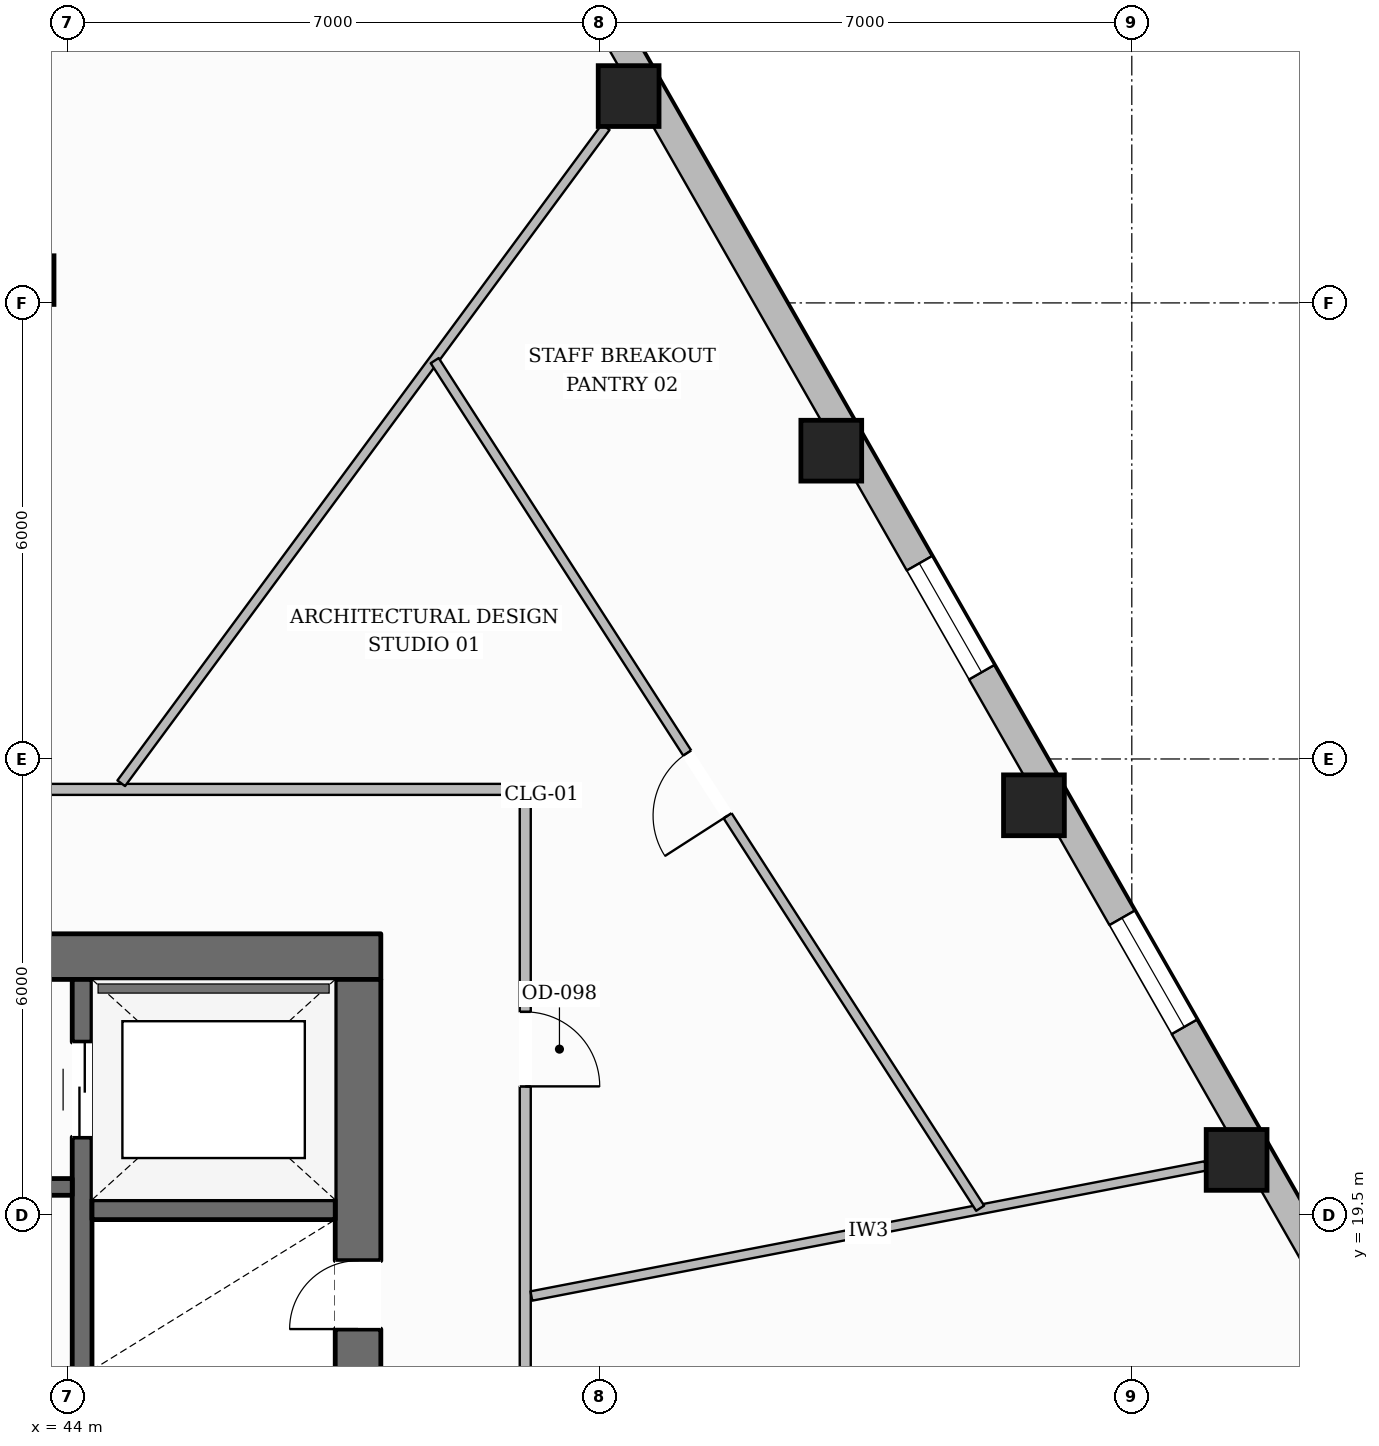
"""IFC4 building model, lengths in metres.
Left out: names, types, materials, properties, quantities, classifications, styles, units other than length and angle.
Written with IfcOpenShell. Run it as: python <this file> out.ifc"""

import sys

from ifc_helpers import new_model, si_unit, direction, frame, frame_2d, origin, origin_2d, place, context, subcontext, project, spatial, rectangle, hollow_rectangle, extrude, element, fill, save


model = new_model("IFC4")
c1 = context("Model", 3, precision=1e-05, world=origin(), true_north=direction((0.0, 1.0)))
c2 = subcontext(c1, "Body", "Model", "MODEL_VIEW")
j1 = project(units=[si_unit("LENGTHUNIT", "METRE"), si_unit("PLANEANGLEUNIT", "RADIAN")], contexts=[c1])
p1 = place(None, origin())
s1 = spatial("IfcSite", under=j1, at=p1, CompositionType="ELEMENT")
p2 = place(p1, origin())
s2 = spatial("IfcBuilding", under=s1, at=p2, CompositionType="ELEMENT")
p3 = place(p2, frame((0.0, 0.0, 9.85)))
s3 = spatial("IfcBuildingStorey", under=s2, at=p3, CompositionType="ELEMENT", Elevation=9.85)
p4 = place(p3, frame((27.88, 22.9, 0.0), z_axis=(0.0, 0.0, 1.0), x_axis=(1.0, 0.0, 0.0)))
e1 = element("IfcWall", 1, at=p4, inside=s3, PredefinedType="SOLIDWALL", context=c2, shape_type="SweptSolid", body=[
    extrude(rectangle(XDim=20.24, YDim=0.6, at=frame_2d((10.12, 0.0))), origin(), (0.0, 0.0, 1.0), 3.59),
])
p5 = place(p4, frame((6.395, 0.0, 0.0)))
e2 = element("IfcOpeningElement", 2, at=p5, cuts=e1, PredefinedType="OPENING", context=c2, shape_type="SweptSolid", body=[
    extrude(rectangle(XDim=1.05, YDim=2.15, at=frame_2d((0.525, 1.075))), frame((0.0, 0.31, 0.0), z_axis=(0.0, -1.0, 0.0), x_axis=(1.0, 0.0, 0.0)), (0.0, 0.0, 1.0), 0.62),
])
p6 = place(p4, frame((12.795, 0.0, 0.0)))
e3 = element("IfcOpeningElement", 3, at=p6, cuts=e1, PredefinedType="OPENING", context=c2, shape_type="SweptSolid", body=[
    extrude(rectangle(XDim=1.05, YDim=2.15, at=frame_2d((0.525, 1.075))), frame((0.0, 0.31, 0.0), z_axis=(0.0, -1.0, 0.0), x_axis=(1.0, 0.0, 0.0)), (0.0, 0.0, 1.0), 0.62),
])
p7 = place(p3, frame((47.82, 9.6, 0.0), z_axis=(0.0, 0.0, 1.0), x_axis=(0.0, 1.0, 0.0)))
e4 = element("IfcWall", 4, at=p7, inside=s3, PredefinedType="SOLIDWALL", context=c2, shape_type="SweptSolid", body=[
    extrude(rectangle(XDim=13.0, YDim=0.6, at=frame_2d((6.5, 0.0))), origin(), (0.0, 0.0, 1.0), 3.59),
])
p8 = place(p7, frame((0.2, 0.0, 0.0)))
e5 = element("IfcOpeningElement", 5, at=p8, cuts=e4, PredefinedType="OPENING", context=c2, shape_type="SweptSolid", body=[
    extrude(rectangle(XDim=1.1, YDim=2.15, at=frame_2d((0.55, 1.075))), frame((0.0, 0.31, 0.0), z_axis=(0.0, -1.0, 0.0), x_axis=(1.0, 0.0, 0.0)), (0.0, 0.0, 1.0), 0.62),
])
p9 = place(p7, frame((8.4, 0.0, 0.0)))
e6 = element("IfcOpeningElement", 6, at=p9, cuts=e4, PredefinedType="OPENING", context=c2, shape_type="SweptSolid", body=[
    extrude(rectangle(XDim=0.9, YDim=2.1, at=frame_2d((0.45, 1.05))), frame((0.0, 0.31, 0.0), z_axis=(0.0, -1.0, 0.0), x_axis=(1.0, 0.0, 0.0)), (0.0, 0.0, 1.0), 0.62),
])
p10 = place(p3, frame((44.19, 9.6, 0.0), z_axis=(0.0, 0.0, 1.0), x_axis=(0.0, 1.0, 0.0)))
e7 = element("IfcWall", 7, at=p10, inside=s3, PredefinedType="SHEAR", context=c2, shape_type="SweptSolid", body=[
    extrude(rectangle(XDim=13.0, YDim=0.26, at=frame_2d((6.5, 0.0))), origin(), (0.0, 0.0, 1.0), 3.59),
])
p11 = place(p10, frame((10.925, 0.0, 0.0)))
e8 = element("IfcOpeningElement", 8, at=p11, cuts=e7, PredefinedType="OPENING", context=c2, shape_type="SweptSolid", body=[
    extrude(rectangle(XDim=1.25, YDim=2.25, at=frame_2d((0.625, 1.125))), frame((0.0, 0.14, 0.0), z_axis=(0.0, -1.0, 0.0), x_axis=(1.0, 0.0, 0.0)), (0.0, 0.0, 1.0), 0.28),
])
p12 = place(p3, frame((44.32, 19.57, 0.0), z_axis=(0.0, 0.0, 1.0), x_axis=(1.0, 0.0, 0.0)))
e9 = element("IfcWall", 9, at=p12, inside=s3, PredefinedType="SHEAR", context=c2, shape_type="SweptSolid", body=[
    extrude(rectangle(XDim=3.2, YDim=0.26, at=frame_2d((1.6, 0.0))), origin(), (0.0, 0.0, 1.0), 3.59),
])
p13 = place(p3, frame((31.94, 19.87, 0.0), z_axis=(0.0, 0.0, 1.0), x_axis=(1.0, 0.0, 0.0)))
e10 = element("IfcWall", 10, at=p13, inside=s3, PredefinedType="SOLIDWALL", context=c2, shape_type="SweptSolid", body=[
    extrude(rectangle(XDim=12.12, YDim=0.22, at=frame_2d((6.06, 0.0))), origin(), (0.0, 0.0, 1.0), 3.59),
])
p14 = place(p13, frame((6.3, 0.0, 0.0)))
e11 = element("IfcOpeningElement", 11, at=p14, cuts=e10, PredefinedType="OPENING", context=c2, shape_type="SweptSolid", body=[
    extrude(rectangle(XDim=1.1, YDim=2.15, at=frame_2d((0.55, 1.075))), frame((0.0, 0.12, 0.0), z_axis=(0.0, -1.0, 0.0), x_axis=(1.0, 0.0, 0.0)), (0.0, 0.0, 1.0), 0.24),
])
p15 = place(p13, frame((8.61, 0.0, 0.0)))
e12 = element("IfcOpeningElement", 12, at=p15, cuts=e10, PredefinedType="OPENING", context=c2, shape_type="SweptSolid", body=[
    extrude(rectangle(XDim=0.9, YDim=2.1, at=frame_2d((0.45, 1.05))), frame((0.0, 0.12, 0.0), z_axis=(0.0, -1.0, 0.0), x_axis=(1.0, 0.0, 0.0)), (0.0, 0.0, 1.0), 0.24),
])
p16 = place(p13, frame((10.85, 0.0, 0.0)))
e13 = element("IfcOpeningElement", 13, at=p16, cuts=e10, PredefinedType="OPENING", context=c2, shape_type="SweptSolid", body=[
    extrude(rectangle(XDim=0.9, YDim=2.1, at=frame_2d((0.45, 1.05))), frame((0.0, 0.12, 0.0), z_axis=(0.0, -1.0, 0.0), x_axis=(1.0, 0.0, 0.0)), (0.0, 0.0, 1.0), 0.24),
])
for number, where, z_axis, x_axis in (
    (14, (59.379, 20.225, 0.0), (0.0, 0.0, 1.0), (1.0, 0.0, 0.0)),
    (15, (56.712, 24.891, 0.0), (0.0, 0.0, 1.0), (1.0, 0.0, 0.0)),
    (16, (54.046, 29.556, 0.0), (0.0, 0.0, 1.0), (1.0, 0.0, 0.0)),
    (17, (51.38, 34.221, 0.0), (0.0, 0.0, 1.0), (1.0, 0.0, 0.0)),
):
    element("IfcColumn", number, at=place(p3, frame(where, z_axis=z_axis, x_axis=x_axis)), inside=s3, PredefinedType="COLUMN", context=c2, shape_type="SweptSolid", body=[
        extrude(hollow_rectangle(XDim=0.8, YDim=0.8, WallThickness=0.036, at=origin_2d()), origin(), (0.0, 0.0, 1.0), 3.59),
    ])
p17 = place(p3, frame((43.5, 31.8, 0.0), z_axis=(0.0, 0.0, 1.0), x_axis=(1.0, 0.0, 0.0)))
e18 = element("IfcColumn", 18, at=p17, inside=s3, PredefinedType="COLUMN", context=c2, shape_type="SweptSolid", body=[
    extrude(hollow_rectangle(XDim=0.64, YDim=0.64, WallThickness=0.028, at=origin_2d()), origin(), (0.0, 0.0, 1.0), 3.59),
])
p18 = place(p3, frame((46.044, 44.103, 0.0), z_axis=(0.0, 0.0, 1.0), x_axis=(0.496189626602, -0.86821417545, 0.0)))
e19 = element("IfcWall", 19, at=p18, inside=s3, PredefinedType="STANDARD", context=c2, shape_type="SweptSolid", body=[
    extrude(rectangle(XDim=33.196, YDim=0.38, at=frame_2d((16.598, 0.0))), origin(), (0.0, 0.0, 1.0), 2.97),
])
p19 = place(p18, frame((7.899, 0.0, 0.0)))
e20 = element("IfcOpeningElement", 20, at=p19, cuts=e19, PredefinedType="OPENING", context=c2, shape_type="SweptSolid", body=[
    extrude(rectangle(XDim=1.0, YDim=2.2, at=frame_2d((0.5, 1.1))), frame((0.0, 0.2, 0.0), z_axis=(0.0, -1.0, 0.0), x_axis=(1.0, 0.0, 0.0)), (0.0, 0.0, 1.0), 0.4),
])
p20 = place(p18, frame((29.209, 0.0, 0.65)))
e21 = element("IfcOpeningElement", 21, at=p20, cuts=e19, PredefinedType="OPENING", context=c2, shape_type="SweptSolid", body=[
    extrude(rectangle(XDim=1.65, YDim=1.75, at=frame_2d((0.825, 0.875))), frame((0.0, 0.2, 0.0), z_axis=(0.0, -1.0, 0.0), x_axis=(1.0, 0.0, 0.0)), (0.0, 0.0, 1.0), 0.4),
])
p21 = place(p18, frame((23.835, 0.0, 0.65)))
e22 = element("IfcOpeningElement", 22, at=p21, cuts=e19, PredefinedType="OPENING", context=c2, shape_type="SweptSolid", body=[
    extrude(rectangle(XDim=1.65, YDim=1.75, at=frame_2d((0.825, 0.875))), frame((0.0, 0.2, 0.0), z_axis=(0.0, -1.0, 0.0), x_axis=(1.0, 0.0, 0.0)), (0.0, 0.0, 1.0), 0.4),
])
p22 = place(p18, frame((18.462, 0.0, 0.65)))
e23 = element("IfcOpeningElement", 23, at=p22, cuts=e19, PredefinedType="OPENING", context=c2, shape_type="SweptSolid", body=[
    extrude(rectangle(XDim=1.65, YDim=1.75, at=frame_2d((0.825, 0.875))), frame((0.0, 0.2, 0.0), z_axis=(0.0, -1.0, 0.0), x_axis=(1.0, 0.0, 0.0)), (0.0, 0.0, 1.0), 0.4),
])
p23 = place(p18, frame((2.342, 0.0, 0.65)))
e24 = element("IfcOpeningElement", 24, at=p23, cuts=e19, PredefinedType="OPENING", context=c2, shape_type="SweptSolid", body=[
    extrude(rectangle(XDim=1.65, YDim=1.75, at=frame_2d((0.825, 0.875))), frame((0.0, 0.2, 0.0), z_axis=(0.0, -1.0, 0.0), x_axis=(1.0, 0.0, 0.0)), (0.0, 0.0, 1.0), 0.4),
])
p24 = place(p3, frame((39.0, 25.1, 0.0), z_axis=(0.0, 0.0, 1.0), x_axis=(1.0, 0.0, 0.0)))
e25 = element("IfcWall", 25, at=p24, inside=s3, PredefinedType="PARTITIONING", context=c2, shape_type="SweptSolid", body=[
    extrude(rectangle(XDim=11.02, YDim=0.145, at=frame_2d((5.51, 0.0))), origin(), (0.0, 0.0, 1.0), 3.59),
])
p25 = place(p3, frame((50.02, 25.1, 0.0), z_axis=(0.0, 0.0, 1.0), x_axis=(0.0, -1.0, 0.0)))
e26 = element("IfcWall", 26, at=p25, inside=s3, PredefinedType="PARTITIONING", context=c2, shape_type="SweptSolid", body=[
    extrude(rectangle(XDim=16.0, YDim=0.145, at=frame_2d((8.0, 0.0))), origin(), (0.0, 0.0, 1.0), 3.278),
])
p26 = place(p25, frame((2.927, 0.0, 0.0)))
e27 = element("IfcOpeningElement", 27, at=p26, cuts=e26, PredefinedType="OPENING", context=c2, shape_type="SweptSolid", body=[
    extrude(rectangle(XDim=0.98, YDim=2.15, at=frame_2d((0.49, 1.075))), frame((0.0, 0.083, 0.0), z_axis=(0.0, -1.0, 0.0), x_axis=(1.0, 0.0, 0.0)), (0.0, 0.0, 1.0), 0.165),
])
p27 = place(p3, frame((50.101, 18.435, 0.0), z_axis=(0.0, 0.0, 1.0), x_axis=(0.98189060445, 0.189448781713, 0.0)))
e28 = element("IfcWall", 28, at=p27, inside=s3, PredefinedType="PARTITIONING", context=c2, shape_type="SweptSolid", body=[
    extrude(rectangle(XDim=9.034, YDim=0.125, at=frame_2d((4.517, 0.0))), origin(), (0.0, 0.0, 1.0), 3.057),
])
p28 = place(p3, frame((44.705, 25.18, 0.0), z_axis=(0.0, 0.0, 1.0), x_axis=(0.593984136355, 0.804476752777, 0.0)))
e29 = element("IfcWall", 29, at=p28, inside=s3, PredefinedType="PARTITIONING", context=c2, shape_type="SweptSolid", body=[
    extrude(rectangle(XDim=10.731, YDim=0.125, at=frame_2d((5.365, 0.0))), origin(), (0.0, 0.0, 1.0), 3.057),
])
p29 = place(p3, frame((56.005, 19.59, 0.0), z_axis=(0.0, 0.0, 1.0), x_axis=(-0.541141843648, 0.840931331949, 0.0)))
e30 = element("IfcWall", 30, at=p29, inside=s3, PredefinedType="PARTITIONING", context=c2, shape_type="SweptSolid", body=[
    extrude(rectangle(XDim=13.26, YDim=0.125, at=frame_2d((6.63, 0.0))), origin(), (0.0, 0.0, 1.0), 3.59),
])
p30 = place(p29, frame((6.141, 0.0, 0.0)))
e31 = element("IfcOpeningElement", 31, at=p30, cuts=e30, PredefinedType="OPENING", context=c2, shape_type="SweptSolid", body=[
    extrude(rectangle(XDim=0.98, YDim=2.15, at=frame_2d((0.49, 1.075))), frame((0.0, 0.073, 0.0), z_axis=(0.0, -1.0, 0.0), x_axis=(1.0, 0.0, 0.0)), (0.0, 0.0, 1.0), 0.145),
])
p31 = place(p21, origin())
e32 = element("IfcWindow", 32, at=p31, inside=s3, PartitioningType="SINGLE_PANEL", PredefinedType="WINDOW", context=c2, shape_type="SweptSolid", body=[
    extrude(rectangle(XDim=1.65, YDim=1.75, at=frame_2d((0.825, 0.875))), frame((0.0, 0.03, 0.0), z_axis=(0.0, -1.0, 0.0), x_axis=(1.0, 0.0, 0.0)), (0.0, 0.0, 1.0), 0.06),
])
fill(e22, e32)
p32 = place(p22, origin())
e33 = element("IfcWindow", 33, at=p32, inside=s3, PartitioningType="SINGLE_PANEL", PredefinedType="WINDOW", context=c2, shape_type="SweptSolid", body=[
    extrude(rectangle(XDim=1.65, YDim=1.75, at=frame_2d((0.825, 0.875))), frame((0.0, 0.03, 0.0), z_axis=(0.0, -1.0, 0.0), x_axis=(1.0, 0.0, 0.0)), (0.0, 0.0, 1.0), 0.06),
])
fill(e23, e33)
p33 = place(p9, origin())
e34 = element("IfcDoor", 34, at=p33, inside=s3, OperationType="SINGLE_SWING_LEFT", PredefinedType="DOOR", context=c2, shape_type="SweptSolid", body=[
    extrude(rectangle(XDim=0.9, YDim=2.1, at=frame_2d((0.45, 1.05))), frame((0.0, 0.025, 0.0), z_axis=(0.0, -1.0, 0.0), x_axis=(1.0, 0.0, 0.0)), (0.0, 0.0, 1.0), 0.05),
])
fill(e6, e34)
p34 = place(p11, origin())
e35 = element("IfcDoor", 35, at=p34, inside=s3, OperationType="DOUBLE_DOOR_SLIDING", PredefinedType="DOOR", context=c2, shape_type="SweptSolid", body=[
    extrude(rectangle(XDim=1.25, YDim=2.25, at=frame_2d((0.625, 1.125))), frame((0.0, 0.025, 0.0), z_axis=(0.0, -1.0, 0.0), x_axis=(1.0, 0.0, 0.0)), (0.0, 0.0, 1.0), 0.05),
])
fill(e8, e35)
p35 = place(p26, origin())
e36 = element("IfcDoor", 36, at=p35, inside=s3, OperationType="SINGLE_SWING_RIGHT", PredefinedType="DOOR", context=c2, shape_type="SweptSolid", body=[
    extrude(rectangle(XDim=0.98, YDim=2.15, at=frame_2d((0.49, 1.075))), frame((0.0, 0.025, 0.0), z_axis=(0.0, -1.0, 0.0), x_axis=(1.0, 0.0, 0.0)), (0.0, 0.0, 1.0), 0.05),
])
fill(e27, e36)
p36 = place(p30, origin())
e37 = element("IfcDoor", 37, at=p36, inside=s3, OperationType="SINGLE_SWING_LEFT", PredefinedType="DOOR", context=c2, shape_type="SweptSolid", body=[
    extrude(rectangle(XDim=0.98, YDim=2.15, at=frame_2d((0.49, 1.075))), frame((0.0, 0.025, 0.0), z_axis=(0.0, -1.0, 0.0), x_axis=(1.0, 0.0, 0.0)), (0.0, 0.0, 1.0), 0.05),
])
fill(e31, e37)
save(model, sys.argv[1])
